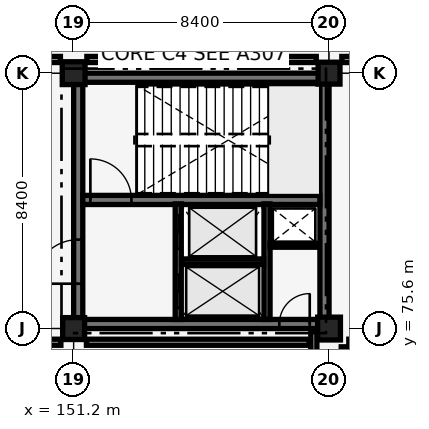
"""IFC4 building model, lengths in metres.
Left out: names, types, materials, properties, quantities, classifications, styles, units other than length and angle.
Written with IfcOpenShell. Run it as: python <this file> out.ifc"""

import sys

from ifc_helpers import new_model, si_unit, direction, frame, frame_2d, origin, origin_2d, place, context, subcontext, project, spatial, rectangle, extrude, element, fill, save


model = new_model("IFC4")
c1 = context("Model", 3, precision=1e-05, world=origin(), true_north=direction((0.0, 1.0)))
c2 = subcontext(c1, "Body", "Model", "MODEL_VIEW")
j1 = project(units=[si_unit("LENGTHUNIT", "METRE"), si_unit("PLANEANGLEUNIT", "RADIAN")], contexts=[c1])
p1 = place(None, origin())
s1 = spatial("IfcSite", under=j1, at=p1, CompositionType="ELEMENT")
p2 = place(p1, origin())
s2 = spatial("IfcBuilding", under=s1, at=p2, CompositionType="ELEMENT")
p3 = place(p2, origin())
s3 = spatial("IfcBuildingStorey", under=s2, at=p3, CompositionType="ELEMENT", Elevation=0.0)
p4 = place(p3, frame((151.35, 75.75, 0.0), z_axis=(0.0, 0.0, 1.0), x_axis=(1.0, 0.0, 0.0)))
e1 = element("IfcWall", 1, at=p4, inside=s3, PredefinedType="SHEAR", context=c2, shape_type="SweptSolid", body=[
    extrude(rectangle(XDim=8.1, YDim=0.3, at=frame_2d((4.05, 0.0))), origin(), (0.0, 0.0, 1.0), 5.14),
])
p5 = place(p4, frame((6.615, 0.0, 0.0)))
e2 = element("IfcOpeningElement", 2, at=p5, cuts=e1, PredefinedType="OPENING", context=c2, shape_type="SweptSolid", body=[
    extrude(rectangle(XDim=1.0, YDim=2.15, at=frame_2d((0.5, 1.075))), frame((0.0, 0.16, 0.0), z_axis=(0.0, -1.0, 0.0), x_axis=(1.0, 0.0, 0.0)), (0.0, 0.0, 1.0), 0.32),
])
p6 = place(p3, frame((151.35, 83.85, 0.0), z_axis=(0.0, 0.0, 1.0), x_axis=(1.0, 0.0, 0.0)))
e3 = element("IfcWall", 3, at=p6, inside=s3, PredefinedType="SHEAR", context=c2, shape_type="SweptSolid", body=[
    extrude(rectangle(XDim=8.1, YDim=0.3, at=frame_2d((4.05, 0.0))), origin(), (0.0, 0.0, 1.0), 5.14),
])
p7 = place(p3, frame((151.35, 75.75, 0.0), z_axis=(0.0, 0.0, 1.0), x_axis=(0.0, 1.0, 0.0)))
e4 = element("IfcWall", 4, at=p7, inside=s3, PredefinedType="SHEAR", context=c2, shape_type="SweptSolid", body=[
    extrude(rectangle(XDim=8.1, YDim=0.3, at=frame_2d((4.05, 0.0))), origin(), (0.0, 0.0, 1.0), 5.14),
])
p8 = place(p7, frame((1.325, 0.0, 0.0)))
e5 = element("IfcOpeningElement", 5, at=p8, cuts=e4, PredefinedType="OPENING", context=c2, shape_type="SweptSolid", body=[
    extrude(rectangle(XDim=1.45, YDim=2.15, at=frame_2d((0.725, 1.075))), frame((0.0, 0.16, 0.0), z_axis=(0.0, -1.0, 0.0), x_axis=(1.0, 0.0, 0.0)), (0.0, 0.0, 1.0), 0.32),
])
p9 = place(p3, frame((159.45, 75.75, 0.0), z_axis=(0.0, 0.0, 1.0), x_axis=(0.0, 1.0, 0.0)))
e6 = element("IfcWall", 6, at=p9, inside=s3, PredefinedType="SHEAR", context=c2, shape_type="SweptSolid", body=[
    extrude(rectangle(XDim=8.1, YDim=0.3, at=frame_2d((4.05, 0.0))), origin(), (0.0, 0.0, 1.0), 5.14),
])
p10 = place(p3, frame((151.5, 79.83, 0.0), z_axis=(0.0, 0.0, 1.0), x_axis=(1.0, 0.0, 0.0)))
e7 = element("IfcWall", 7, at=p10, inside=s3, PredefinedType="SHEAR", context=c2, shape_type="SweptSolid", body=[
    extrude(rectangle(XDim=7.8, YDim=0.3, at=frame_2d((3.9, 0.0))), origin(), (0.0, 0.0, 1.0), 5.14),
])
p11 = place(p10, frame((0.25, 0.0, 0.0)))
e8 = element("IfcOpeningElement", 8, at=p11, cuts=e7, PredefinedType="OPENING", context=c2, shape_type="SweptSolid", body=[
    extrude(rectangle(XDim=1.35, YDim=2.15, at=frame_2d((0.675, 1.075))), frame((0.0, 0.16, 0.0), z_axis=(0.0, -1.0, 0.0), x_axis=(1.0, 0.0, 0.0)), (0.0, 0.0, 1.0), 0.32),
])
p12 = place(p3, frame((151.2, 75.6, 0.0), z_axis=(0.0, 0.0, 1.0), x_axis=(1.0, 0.0, 0.0)))
e9 = element("IfcColumn", 9, at=p12, inside=s3, PredefinedType="COLUMN", context=c2, shape_type="SweptSolid", body=[
    extrude(rectangle(XDim=0.72, YDim=0.72, at=origin_2d()), origin(), (0.0, 0.0, 1.0), 5.14),
])
for number, where, z_axis, x_axis in (
    (10, (151.2, 84.0, 0.0), (0.0, 0.0, 1.0), (1.0, 0.0, 0.0)),
    (11, (159.6, 75.6, 0.0), (0.0, 0.0, 1.0), (1.0, 0.0, 0.0)),
):
    element("IfcColumn", number, at=place(p3, frame(where, z_axis=z_axis, x_axis=x_axis)), inside=s3, PredefinedType="COLUMN", context=c2, shape_type="SweptSolid", body=[
        extrude(rectangle(XDim=0.75, YDim=0.75, at=origin_2d()), origin(), (0.0, 0.0, 1.0), 5.14),
    ])
p13 = place(p3, frame((159.6, 84.0, 0.0), z_axis=(0.0, 0.0, 1.0), x_axis=(1.0, 0.0, 0.0)))
e12 = element("IfcColumn", 12, at=p13, inside=s3, PredefinedType="COLUMN", context=c2, shape_type="SweptSolid", body=[
    extrude(rectangle(XDim=0.72, YDim=0.72, at=origin_2d()), origin(), (0.0, 0.0, 1.0), 5.14),
])
p14 = place(p3, frame((154.64, 75.9, 0.0), z_axis=(0.0, 0.0, 1.0), x_axis=(0.0, 1.0, 0.0)))
e13 = element("IfcWall", 13, at=p14, inside=s3, PredefinedType="SHEAR", context=c2, shape_type="SweptSolid", body=[
    extrude(rectangle(XDim=3.8, YDim=0.2, at=frame_2d((1.9, 0.0))), origin(), (0.0, 0.0, 1.0), 4.46),
])
p15 = place(p14, frame((0.375, 0.0, 0.0)))
e14 = element("IfcOpeningElement", 14, at=p15, cuts=e13, PredefinedType="OPENING", context=c2, shape_type="SweptSolid", body=[
    extrude(rectangle(XDim=1.1, YDim=2.15, at=frame_2d((0.55, 1.075))), frame((0.0, 0.11, 0.0), z_axis=(0.0, -1.0, 0.0), x_axis=(1.0, 0.0, 0.0)), (0.0, 0.0, 1.0), 0.22),
])
p16 = place(p14, frame((2.325, 0.0, 0.0)))
e15 = element("IfcOpeningElement", 15, at=p16, cuts=e13, PredefinedType="OPENING", context=c2, shape_type="SweptSolid", body=[
    extrude(rectangle(XDim=1.1, YDim=2.15, at=frame_2d((0.55, 1.075))), frame((0.0, 0.11, 0.0), z_axis=(0.0, -1.0, 0.0), x_axis=(1.0, 0.0, 0.0)), (0.0, 0.0, 1.0), 0.22),
])
p17 = place(p3, frame((157.56, 75.9, 0.0), z_axis=(0.0, 0.0, 1.0), x_axis=(0.0, 1.0, 0.0)))
e16 = element("IfcWall", 16, at=p17, inside=s3, PredefinedType="SHEAR", context=c2, shape_type="SweptSolid", body=[
    extrude(rectangle(XDim=3.8, YDim=0.2, at=frame_2d((1.9, 0.0))), origin(), (0.0, 0.0, 1.0), 4.46),
])
p18 = place(p3, frame((154.75, 77.8, 0.0), z_axis=(0.0, 0.0, 1.0), x_axis=(1.0, 0.0, 0.0)))
e17 = element("IfcWall", 17, at=p18, inside=s3, PredefinedType="SHEAR", context=c2, shape_type="SweptSolid", body=[
    extrude(rectangle(XDim=2.7, YDim=0.18, at=frame_2d((1.35, 0.0))), origin(), (0.0, 0.0, 1.0), 5.14),
])
p19 = place(p3, frame((157.66, 78.34, 0.0), z_axis=(0.0, 0.0, 1.0), x_axis=(1.0, 0.0, 0.0)))
e18 = element("IfcWall", 18, at=p19, inside=s3, PredefinedType="PARTITIONING", context=c2, shape_type="SweptSolid", body=[
    extrude(rectangle(XDim=1.62, YDim=0.13, at=frame_2d((0.81, 0.0))), origin(), (0.0, 0.0, 1.0), 5.14),
])
p20 = place(p3, frame((143.235, 75.15, 0.0), z_axis=(0.0, 0.0, 1.0), x_axis=(1.0, 0.0, 0.0)))
e19 = element("IfcWall", 19, at=p20, inside=s3, PredefinedType="PARTITIONING", context=c2, shape_type="SweptSolid", body=[
    extrude(rectangle(XDim=7.545, YDim=0.2, at=frame_2d((3.772, 0.0))), origin(), (0.0, 0.0, 1.0), 5.14),
])
p21 = place(p3, frame((151.62, 75.15, 0.0), z_axis=(0.0, 0.0, 1.0), x_axis=(1.0, 0.0, 0.0)))
e20 = element("IfcWall", 20, at=p21, inside=s3, PredefinedType="PARTITIONING", context=c2, shape_type="SweptSolid", body=[
    extrude(rectangle(XDim=7.33, YDim=0.2, at=frame_2d((3.665, 0.0))), origin(), (0.0, 0.0, 1.0), 5.14),
])
p22 = place(p3, frame((159.1, 67.62, 0.0), z_axis=(0.0, 0.0, 1.0), x_axis=(0.0, 1.0, 0.0)))
e21 = element("IfcWall", 21, at=p22, inside=s3, PredefinedType="PARTITIONING", context=c2, shape_type="SweptSolid", body=[
    extrude(rectangle(XDim=7.95, YDim=0.2, at=frame_2d((3.975, 0.0))), origin(), (0.0, 0.0, 1.0), 4.46),
])
p23 = place(p3, frame((160.25, 75.15, 0.0), z_axis=(0.0, 0.0, 1.0), x_axis=(1.0, 0.0, 0.0)))
e22 = element("IfcWall", 22, at=p23, inside=s3, PredefinedType="PARTITIONING", context=c2, shape_type="SweptSolid", body=[
    extrude(rectangle(XDim=7.57, YDim=0.2, at=frame_2d((3.785, 0.0))), origin(), (0.0, 0.0, 1.0), 4.39),
])
p24 = place(p23, frame((3.035, 0.0, 0.0)))
e23 = element("IfcOpeningElement", 23, at=p24, cuts=e22, PredefinedType="OPENING", context=c2, shape_type="SweptSolid", body=[
    extrude(rectangle(XDim=1.5, YDim=2.2, at=frame_2d((0.75, 1.1))), frame((0.0, 0.11, 0.0), z_axis=(0.0, -1.0, 0.0), x_axis=(1.0, 0.0, 0.0)), (0.0, 0.0, 1.0), 0.22),
])
p25 = place(p3, frame((160.1, 67.62, 0.0), z_axis=(0.0, 0.0, 1.0), x_axis=(0.0, 1.0, 0.0)))
e24 = element("IfcWall", 24, at=p25, inside=s3, PredefinedType="PARTITIONING", context=c2, shape_type="SweptSolid", body=[
    extrude(rectangle(XDim=7.38, YDim=0.2, at=frame_2d((3.69, 0.0))), origin(), (0.0, 0.0, 1.0), 4.58),
])
for number, where, z_axis, x_axis in (
    (25, (143.22, 84.45, 0.0), (0.0, 0.0, 1.0), (1.0, 0.0, 0.0)),
    (26, (151.635, 84.45, 0.0), (0.0, 0.0, 1.0), (1.0, 0.0, 0.0)),
):
    element("IfcWall", number, at=place(p3, frame(where, z_axis=z_axis, x_axis=x_axis)), inside=s3, PredefinedType="PARTITIONING", context=c2, shape_type="SweptSolid", body=[
        extrude(rectangle(XDim=7.545, YDim=0.2, at=frame_2d((3.772, 0.0))), origin(), (0.0, 0.0, 1.0), 5.14),
    ])
p26 = place(p3, frame((160.02, 84.45, 0.0), z_axis=(0.0, 0.0, 1.0), x_axis=(1.0, 0.0, 0.0)))
e27 = element("IfcWall", 27, at=p26, inside=s3, PredefinedType="PARTITIONING", context=c2, shape_type="SweptSolid", body=[
    extrude(rectangle(XDim=7.43, YDim=0.2, at=frame_2d((3.715, 0.0))), origin(), (0.0, 0.0, 1.0), 5.14),
])
p27 = place(p11, origin())
e28 = element("IfcDoor", 28, at=p27, inside=s3, OperationType="SINGLE_SWING_LEFT", PredefinedType="DOOR", context=c2, shape_type="SweptSolid", body=[
    extrude(rectangle(XDim=1.35, YDim=2.15, at=frame_2d((0.675, 1.075))), frame((0.0, 0.025, 0.0), z_axis=(0.0, -1.0, 0.0), x_axis=(1.0, 0.0, 0.0)), (0.0, 0.0, 1.0), 0.05),
])
fill(e8, e28)
p28 = place(p15, origin())
e29 = element("IfcDoor", 29, at=p28, inside=s3, OperationType="SLIDING_TO_LEFT", PredefinedType="DOOR", context=c2, shape_type="SweptSolid", body=[
    extrude(rectangle(XDim=1.1, YDim=2.15, at=frame_2d((0.55, 1.075))), frame((0.0, 0.025, 0.0), z_axis=(0.0, -1.0, 0.0), x_axis=(1.0, 0.0, 0.0)), (0.0, 0.0, 1.0), 0.05),
])
fill(e14, e29)
p29 = place(p16, origin())
e30 = element("IfcDoor", 30, at=p29, inside=s3, OperationType="SLIDING_TO_LEFT", PredefinedType="DOOR", context=c2, shape_type="SweptSolid", body=[
    extrude(rectangle(XDim=1.1, YDim=2.15, at=frame_2d((0.55, 1.075))), frame((0.0, 0.025, 0.0), z_axis=(0.0, -1.0, 0.0), x_axis=(1.0, 0.0, 0.0)), (0.0, 0.0, 1.0), 0.05),
])
fill(e15, e30)
p30 = place(p8, origin())
e31 = element("IfcDoor", 31, at=p30, inside=s3, OperationType="DOUBLE_DOOR_SINGLE_SWING", PredefinedType="DOOR", context=c2, shape_type="SweptSolid", body=[
    extrude(rectangle(XDim=1.45, YDim=2.15, at=frame_2d((0.725, 1.075))), frame((0.0, 0.025, 0.0), z_axis=(0.0, -1.0, 0.0), x_axis=(1.0, 0.0, 0.0)), (0.0, 0.0, 1.0), 0.05),
])
fill(e5, e31)
p31 = place(p5, origin())
e32 = element("IfcDoor", 32, at=p31, inside=s3, OperationType="SINGLE_SWING_RIGHT", PredefinedType="DOOR", context=c2, shape_type="SweptSolid", body=[
    extrude(rectangle(XDim=1.0, YDim=2.15, at=frame_2d((0.5, 1.075))), frame((0.0, 0.025, 0.0), z_axis=(0.0, -1.0, 0.0), x_axis=(1.0, 0.0, 0.0)), (0.0, 0.0, 1.0), 0.05),
])
fill(e2, e32)
save(model, sys.argv[1])
